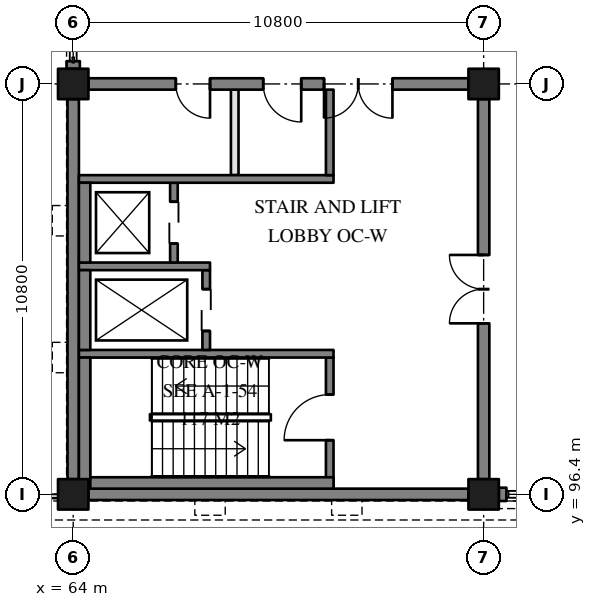
"""IFC4 building model, lengths in metres.
Left out: names, types, materials, properties, quantities, classifications, styles, units other than length and angle.
Written with IfcOpenShell. Run it as: python <this file> out.ifc"""

import sys

from ifc_helpers import new_model, si_unit, direction, frame, frame_2d, origin, origin_2d, place, context, subcontext, project, spatial, rectangle, extrude, element, fill, save


model = new_model("IFC4")
c1 = context("Model", 3, precision=1e-05, world=origin(), true_north=direction((0.0, 1.0)))
c2 = subcontext(c1, "Body", "Model", "MODEL_VIEW")
j1 = project(units=[si_unit("LENGTHUNIT", "METRE"), si_unit("PLANEANGLEUNIT", "RADIAN")], contexts=[c1])
p1 = place(None, origin())
s1 = spatial("IfcSite", under=j1, at=p1, CompositionType="ELEMENT")
p2 = place(p1, origin())
s2 = spatial("IfcBuilding", under=s1, at=p2, CompositionType="ELEMENT")
p3 = place(p2, frame((0.0, 0.0, 4.8)))
s3 = spatial("IfcBuildingStorey", under=s2, at=p3, CompositionType="ELEMENT", Elevation=4.8)
p4 = place(p3, frame((64.0, 96.4, 0.0), z_axis=(0.0, 0.0, 1.0), x_axis=(1.0, 0.0, 0.0)))
e1 = element("IfcColumn", 1, at=p4, inside=s3, PredefinedType="COLUMN", context=c2, shape_type="SweptSolid", body=[
    extrude(rectangle(XDim=0.8, YDim=0.8, at=origin_2d()), origin(), (0.0, 0.0, 1.0), 3.9),
])
p5 = place(p3, frame((64.0, 107.2, -1.3), z_axis=(0.0, 0.0, 1.0), x_axis=(1.0, 0.0, 0.0)))
e2 = element("IfcColumn", 2, at=p5, inside=s3, PredefinedType="COLUMN", context=c2, shape_type="SweptSolid", body=[
    extrude(rectangle(XDim=0.8, YDim=0.8, at=origin_2d()), origin(), (0.0, 0.0, 1.0), 5.2),
])
p6 = place(p3, frame((74.8, 96.4, 0.0), z_axis=(0.0, 0.0, 1.0), x_axis=(1.0, 0.0, 0.0)))
e3 = element("IfcColumn", 3, at=p6, inside=s3, PredefinedType="COLUMN", context=c2, shape_type="SweptSolid", body=[
    extrude(rectangle(XDim=0.8, YDim=0.8, at=origin_2d()), origin(), (0.0, 0.0, 1.0), 3.9),
])
p7 = place(p3, frame((74.8, 107.2, -1.3), z_axis=(0.0, 0.0, 1.0), x_axis=(1.0, 0.0, 0.0)))
e4 = element("IfcColumn", 4, at=p7, inside=s3, PredefinedType="COLUMN", context=c2, shape_type="SweptSolid", body=[
    extrude(rectangle(XDim=0.8, YDim=0.8, at=origin_2d()), origin(), (0.0, 0.0, 1.0), 5.2),
])
p8 = place(p3, frame((64.4, 96.4, 0.0), z_axis=(0.0, 0.0, 1.0), x_axis=(1.0, 0.0, 0.0)))
e5 = element("IfcWall", 5, at=p8, inside=s3, PredefinedType="SOLIDWALL", context=c2, shape_type="SweptSolid", body=[
    extrude(rectangle(XDim=10.0, YDim=0.3, at=frame_2d((5.0, 0.0))), origin(), (0.0, 0.0, 1.0), 3.9),
])
p9 = place(p3, frame((74.8, 96.8, 0.0), z_axis=(0.0, 0.0, 1.0), x_axis=(0.0, 1.0, 0.0)))
e6 = element("IfcWall", 6, at=p9, inside=s3, PredefinedType="SOLIDWALL", context=c2, shape_type="SweptSolid", body=[
    extrude(rectangle(XDim=10.0, YDim=0.3, at=frame_2d((5.0, 0.0))), origin(), (0.0, 0.0, 1.0), 3.9),
])
p10 = place(p9, frame((4.1, 0.0, 0.0)))
e7 = element("IfcOpeningElement", 7, at=p10, cuts=e6, PredefinedType="OPENING", context=c2, shape_type="SweptSolid", body=[
    extrude(rectangle(XDim=1.8, YDim=2.1, at=frame_2d((0.9, 1.05))), frame((0.0, 0.16, 0.0), z_axis=(0.0, -1.0, 0.0), x_axis=(1.0, 0.0, 0.0)), (0.0, 0.0, 1.0), 0.32),
])
p11 = place(p3, frame((74.4, 107.2, 0.0), z_axis=(0.0, 0.0, 1.0), x_axis=(-1.0, 0.0, 0.0)))
e8 = element("IfcWall", 8, at=p11, inside=s3, PredefinedType="SOLIDWALL", context=c2, shape_type="SweptSolid", body=[
    extrude(rectangle(XDim=10.0, YDim=0.3, at=frame_2d((5.0, 0.0))), origin(), (0.0, 0.0, 1.0), 3.9),
])
p12 = place(p11, frame((2.0, 0.0, 0.0)))
e9 = element("IfcOpeningElement", 9, at=p12, cuts=e8, PredefinedType="OPENING", context=c2, shape_type="SweptSolid", body=[
    extrude(rectangle(XDim=1.8, YDim=2.1, at=frame_2d((0.9, 1.05))), frame((0.0, 0.16, 0.0), z_axis=(0.0, -1.0, 0.0), x_axis=(1.0, 0.0, 0.0)), (0.0, 0.0, 1.0), 0.32),
])
p13 = place(p11, frame((4.4, 0.0, 0.0)))
e10 = element("IfcOpeningElement", 10, at=p13, cuts=e8, PredefinedType="OPENING", context=c2, shape_type="SweptSolid", body=[
    extrude(rectangle(XDim=1.0, YDim=2.1, at=frame_2d((0.5, 1.05))), frame((0.0, 0.16, 0.0), z_axis=(0.0, -1.0, 0.0), x_axis=(1.0, 0.0, 0.0)), (0.0, 0.0, 1.0), 0.32),
])
p14 = place(p11, frame((6.8, 0.0, 0.0)))
e11 = element("IfcOpeningElement", 11, at=p14, cuts=e8, PredefinedType="OPENING", context=c2, shape_type="SweptSolid", body=[
    extrude(rectangle(XDim=0.9, YDim=2.1, at=frame_2d((0.45, 1.05))), frame((0.0, 0.16, 0.0), z_axis=(0.0, -1.0, 0.0), x_axis=(1.0, 0.0, 0.0)), (0.0, 0.0, 1.0), 0.32),
])
p15 = place(p3, frame((64.0, 106.8, 0.0), z_axis=(0.0, 0.0, 1.0), x_axis=(0.0, -1.0, 0.0)))
e12 = element("IfcWall", 12, at=p15, inside=s3, PredefinedType="SOLIDWALL", context=c2, shape_type="SweptSolid", body=[
    extrude(rectangle(XDim=10.0, YDim=0.3, at=frame_2d((5.0, 0.0))), origin(), (0.0, 0.0, 1.0), 3.9),
])
for number, where, z_axis, x_axis in (
    (13, (75.2, 96.4, 0.0), (0.0, 0.0, 1.0), (1.0, 0.0, 0.0)),
    (14, (64.0, 107.6, 0.0), (0.0, 0.0, 1.0), (0.0, 1.0, 0.0)),
):
    element("IfcWall", number, at=place(p3, frame(where, z_axis=z_axis, x_axis=x_axis)), inside=s3, PredefinedType="SOLIDWALL", context=c2, shape_type="SweptSolid", body=[
        extrude(rectangle(XDim=0.2, YDim=0.35, at=frame_2d((0.1, 0.0))), origin(), (0.0, 0.0, 1.0), 3.6),
    ])
p16 = place(p3, frame((70.75, 96.55, 0.0), z_axis=(0.0, 0.0, 1.0), x_axis=(0.0, 1.0, 0.0)))
e15 = element("IfcWall", 15, at=p16, inside=s3, PredefinedType="SOLIDWALL", context=c2, shape_type="SweptSolid", body=[
    extrude(rectangle(XDim=3.45, YDim=0.2, at=frame_2d((1.725, 0.0))), origin(), (0.0, 0.0, 1.0), 3.6),
])
p17 = place(p16, frame((1.275, 0.0, 0.0)))
e16 = element("IfcOpeningElement", 16, at=p17, cuts=e15, PredefinedType="OPENING", context=c2, shape_type="SweptSolid", body=[
    extrude(rectangle(XDim=1.2, YDim=2.1, at=frame_2d((0.6, 1.05))), frame((0.0, 0.11, 0.0), z_axis=(0.0, -1.0, 0.0), x_axis=(1.0, 0.0, 0.0)), (0.0, 0.0, 1.0), 0.22),
])
p18 = place(p3, frame((70.85, 100.1, 0.0), z_axis=(0.0, 0.0, 1.0), x_axis=(-1.0, 0.0, 0.0)))
e17 = element("IfcWall", 17, at=p18, inside=s3, PredefinedType="SOLIDWALL", context=c2, shape_type="SweptSolid", body=[
    extrude(rectangle(XDim=6.7, YDim=0.2, at=frame_2d((3.35, 0.0))), origin(), (0.0, 0.0, 1.0), 3.6),
])
p19 = place(p3, frame((67.5, 100.2, 0.0), z_axis=(0.0, 0.0, 1.0), x_axis=(0.0, 1.0, 0.0)))
e18 = element("IfcWall", 18, at=p19, inside=s3, PredefinedType="SOLIDWALL", context=c2, shape_type="SweptSolid", body=[
    extrude(rectangle(XDim=2.1, YDim=0.2, at=frame_2d((1.05, 0.0))), origin(), (0.0, 0.0, 1.0), 3.6),
])
p20 = place(p19, frame((0.5, 0.0, 0.0)))
e19 = element("IfcOpeningElement", 19, at=p20, cuts=e18, PredefinedType="OPENING", context=c2, shape_type="SweptSolid", body=[
    extrude(rectangle(XDim=1.1, YDim=2.1, at=frame_2d((0.55, 1.05))), frame((0.0, 0.11, 0.0), z_axis=(0.0, -1.0, 0.0), x_axis=(1.0, 0.0, 0.0)), (0.0, 0.0, 1.0), 0.22),
])
p21 = place(p3, frame((67.6, 102.4, 0.0), z_axis=(0.0, 0.0, 1.0), x_axis=(-1.0, 0.0, 0.0)))
e20 = element("IfcWall", 20, at=p21, inside=s3, PredefinedType="SOLIDWALL", context=c2, shape_type="SweptSolid", body=[
    extrude(rectangle(XDim=3.45, YDim=0.2, at=frame_2d((1.725, 0.0))), origin(), (0.0, 0.0, 1.0), 3.6),
])
p22 = place(p3, frame((66.65, 102.5, 0.0), z_axis=(0.0, 0.0, 1.0), x_axis=(0.0, 1.0, 0.0)))
e21 = element("IfcWall", 21, at=p22, inside=s3, PredefinedType="SOLIDWALL", context=c2, shape_type="SweptSolid", body=[
    extrude(rectangle(XDim=2.1, YDim=0.2, at=frame_2d((1.05, 0.0))), origin(), (0.0, 0.0, 1.0), 3.6),
])
p23 = place(p22, frame((0.5, 0.0, 0.0)))
e22 = element("IfcOpeningElement", 22, at=p23, cuts=e21, PredefinedType="OPENING", context=c2, shape_type="SweptSolid", body=[
    extrude(rectangle(XDim=1.1, YDim=2.1, at=frame_2d((0.55, 1.05))), frame((0.0, 0.11, 0.0), z_axis=(0.0, -1.0, 0.0), x_axis=(1.0, 0.0, 0.0)), (0.0, 0.0, 1.0), 0.22),
])
p24 = place(p3, frame((70.85, 104.7, 0.0), z_axis=(0.0, 0.0, 1.0), x_axis=(-1.0, 0.0, 0.0)))
e23 = element("IfcWall", 23, at=p24, inside=s3, PredefinedType="SOLIDWALL", context=c2, shape_type="SweptSolid", body=[
    extrude(rectangle(XDim=6.7, YDim=0.2, at=frame_2d((3.35, 0.0))), origin(), (0.0, 0.0, 1.0), 3.6),
])
p25 = place(p3, frame((70.75, 104.8, 0.0), z_axis=(0.0, 0.0, 1.0), x_axis=(0.0, 1.0, 0.0)))
e24 = element("IfcWall", 24, at=p25, inside=s3, PredefinedType="SOLIDWALL", context=c2, shape_type="SweptSolid", body=[
    extrude(rectangle(XDim=2.25, YDim=0.2, at=frame_2d((1.125, 0.0))), origin(), (0.0, 0.0, 1.0), 3.6),
])
p26 = place(p3, frame((70.85, 96.7, 0.0), z_axis=(0.0, 0.0, 1.0), x_axis=(-1.0, 0.0, 0.0)))
e25 = element("IfcWall", 25, at=p26, inside=s3, PredefinedType="SOLIDWALL", context=c2, shape_type="SweptSolid", body=[
    extrude(rectangle(XDim=6.7, YDim=0.3, at=frame_2d((3.35, 0.0))), origin(), (0.0, 0.0, 1.0), 3.6),
])
p27 = place(p3, frame((64.3, 96.55, 0.0), z_axis=(0.0, 0.0, 1.0), x_axis=(0.0, 1.0, 0.0)))
e26 = element("IfcWall", 26, at=p27, inside=s3, PredefinedType="SOLIDWALL", context=c2, shape_type="SweptSolid", body=[
    extrude(rectangle(XDim=3.45, YDim=0.3, at=frame_2d((1.725, 0.0))), origin(), (0.0, 0.0, 1.0), 3.6),
])
for number, where, z_axis, x_axis in (
    (27, (64.3, 100.2, 0.0), (0.0, 0.0, 1.0), (0.0, 1.0, 0.0)),
    (28, (64.3, 102.5, 0.0), (0.0, 0.0, 1.0), (0.0, 1.0, 0.0)),
):
    element("IfcWall", number, at=place(p3, frame(where, z_axis=z_axis, x_axis=x_axis)), inside=s3, PredefinedType="SOLIDWALL", context=c2, shape_type="SweptSolid", body=[
        extrude(rectangle(XDim=2.1, YDim=0.3, at=frame_2d((1.05, 0.0))), origin(), (0.0, 0.0, 1.0), 3.6),
    ])
p28 = place(p3, frame((68.25, 104.8, 0.0), z_axis=(0.0, 0.0, 1.0), x_axis=(0.0, 1.0, 0.0)))
e29 = element("IfcWall", 29, at=p28, inside=s3, PredefinedType="PARTITIONING", context=c2, shape_type="SweptSolid", body=[
    extrude(rectangle(XDim=2.25, YDim=0.2, at=frame_2d((1.125, 0.0))), origin(), (0.0, 0.0, 1.0), 3.6),
])
p29 = place(p20, frame((1.1, 0.0, 0.0), z_axis=(0.0, 0.0, 1.0), x_axis=(-1.0, 0.0, 0.0)))
e30 = element("IfcDoor", 30, at=p29, inside=s3, OperationType="DOUBLE_DOOR_SLIDING", PredefinedType="DOOR", context=c2, shape_type="SweptSolid", body=[
    extrude(rectangle(XDim=1.1, YDim=2.1, at=frame_2d((0.55, 1.05))), frame((0.0, 0.025, 0.0), z_axis=(0.0, -1.0, 0.0), x_axis=(1.0, 0.0, 0.0)), (0.0, 0.0, 1.0), 0.05),
])
fill(e19, e30)
p30 = place(p23, frame((1.1, 0.0, 0.0), z_axis=(0.0, 0.0, 1.0), x_axis=(-1.0, 0.0, 0.0)))
e31 = element("IfcDoor", 31, at=p30, inside=s3, OperationType="DOUBLE_DOOR_SLIDING", PredefinedType="DOOR", context=c2, shape_type="SweptSolid", body=[
    extrude(rectangle(XDim=1.1, YDim=2.1, at=frame_2d((0.55, 1.05))), frame((0.0, 0.025, 0.0), z_axis=(0.0, -1.0, 0.0), x_axis=(1.0, 0.0, 0.0)), (0.0, 0.0, 1.0), 0.05),
])
fill(e22, e31)
p31 = place(p17, frame((1.2, 0.0, 0.0), z_axis=(0.0, 0.0, 1.0), x_axis=(-1.0, 0.0, 0.0)))
e32 = element("IfcDoor", 32, at=p31, inside=s3, OperationType="SINGLE_SWING_LEFT", PredefinedType="DOOR", context=c2, shape_type="SweptSolid", body=[
    extrude(rectangle(XDim=1.2, YDim=2.1, at=frame_2d((0.6, 1.05))), frame((0.0, 0.025, 0.0), z_axis=(0.0, -1.0, 0.0), x_axis=(1.0, 0.0, 0.0)), (0.0, 0.0, 1.0), 0.05),
])
fill(e16, e32)
p32 = place(p10, frame((1.8, 0.0, 0.0), z_axis=(0.0, 0.0, 1.0), x_axis=(-1.0, 0.0, 0.0)))
e33 = element("IfcDoor", 33, at=p32, inside=s3, OperationType="DOUBLE_DOOR_DOUBLE_SWING", PredefinedType="DOOR", context=c2, shape_type="SweptSolid", body=[
    extrude(rectangle(XDim=1.8, YDim=2.1, at=frame_2d((0.9, 1.05))), frame((0.0, 0.025, 0.0), z_axis=(0.0, -1.0, 0.0), x_axis=(1.0, 0.0, 0.0)), (0.0, 0.0, 1.0), 0.05),
])
fill(e7, e33)
p33 = place(p12, frame((1.8, 0.0, 0.0), z_axis=(0.0, 0.0, 1.0), x_axis=(-1.0, 0.0, 0.0)))
e34 = element("IfcDoor", 34, at=p33, inside=s3, OperationType="DOUBLE_DOOR_DOUBLE_SWING", PredefinedType="DOOR", context=c2, shape_type="SweptSolid", body=[
    extrude(rectangle(XDim=1.8, YDim=2.1, at=frame_2d((0.9, 1.05))), frame((0.0, 0.025, 0.0), z_axis=(0.0, -1.0, 0.0), x_axis=(1.0, 0.0, 0.0)), (0.0, 0.0, 1.0), 0.05),
])
fill(e9, e34)
p34 = place(p13, origin())
e35 = element("IfcDoor", 35, at=p34, inside=s3, OperationType="SINGLE_SWING_LEFT", PredefinedType="DOOR", context=c2, shape_type="SweptSolid", body=[
    extrude(rectangle(XDim=1.0, YDim=2.1, at=frame_2d((0.5, 1.05))), frame((0.0, 0.025, 0.0), z_axis=(0.0, -1.0, 0.0), x_axis=(1.0, 0.0, 0.0)), (0.0, 0.0, 1.0), 0.05),
])
fill(e10, e35)
p35 = place(p14, origin())
e36 = element("IfcDoor", 36, at=p35, inside=s3, OperationType="SINGLE_SWING_RIGHT", PredefinedType="DOOR", context=c2, shape_type="SweptSolid", body=[
    extrude(rectangle(XDim=0.9, YDim=2.1, at=frame_2d((0.45, 1.05))), frame((0.0, 0.025, 0.0), z_axis=(0.0, -1.0, 0.0), x_axis=(1.0, 0.0, 0.0)), (0.0, 0.0, 1.0), 0.05),
])
fill(e11, e36)
save(model, sys.argv[1])
